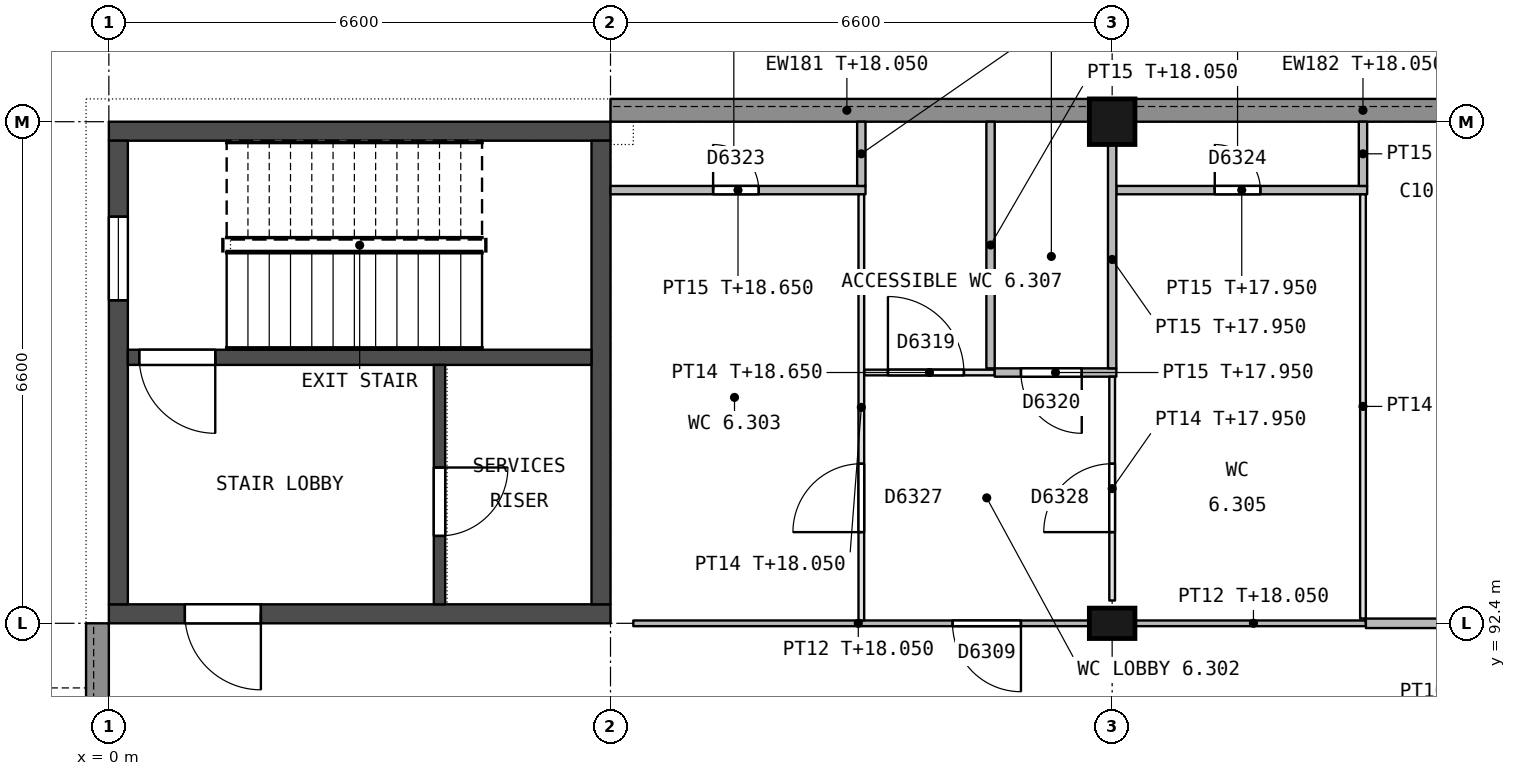
"""IFC4 building model, lengths in metres.
Left out: names, types, materials, properties, quantities, classifications, styles, units other than length and angle.
Written with IfcOpenShell. Run it as: python <this file> out.ifc"""

import sys

from ifc_helpers import new_model, si_unit, direction, frame, frame_2d, origin, origin_2d, place, context, subcontext, project, spatial, rectangle, extrude, element, fill, save


model = new_model("IFC4")
c1 = context("Model", 3, precision=1e-05, world=origin(), true_north=direction((0.0, 1.0)))
c2 = subcontext(c1, "Body", "Model", "MODEL_VIEW")
j1 = project(units=[si_unit("LENGTHUNIT", "METRE"), si_unit("PLANEANGLEUNIT", "RADIAN")], contexts=[c1])
p1 = place(None, origin())
s1 = spatial("IfcSite", under=j1, at=p1, CompositionType="ELEMENT")
p2 = place(p1, origin())
s2 = spatial("IfcBuilding", under=s1, at=p2, CompositionType="ELEMENT")
p3 = place(p2, frame((0.0, 0.0, 14.4)))
s3 = spatial("IfcBuildingStorey", under=s2, at=p3, CompositionType="ELEMENT", Elevation=14.4)
p4 = place(p3, frame((13.2, 92.4, 0.0), z_axis=(0.0, 0.0, 1.0), x_axis=(1.0, 0.0, 0.0)))
e1 = element("IfcColumn", 1, at=p4, inside=s3, PredefinedType="COLUMN", context=c2, shape_type="SweptSolid", body=[
    extrude(rectangle(XDim=0.6, YDim=0.4, at=origin_2d()), origin(), (0.0, 0.0, 1.0), 4.5),
])
p5 = place(p3, frame((13.2, 99.0, 0.0), z_axis=(0.0, 0.0, 1.0), x_axis=(1.0, 0.0, 0.0)))
e2 = element("IfcColumn", 2, at=p5, inside=s3, PredefinedType="COLUMN", context=c2, shape_type="SweptSolid", body=[
    extrude(rectangle(XDim=0.6, YDim=0.6, at=origin_2d()), origin(), (0.0, 0.0, 1.0), 4.5),
])
p6 = place(p3, frame((0.0, 92.525, 0.0), z_axis=(0.0, 0.0, 1.0), x_axis=(1.0, 0.0, 0.0)))
e3 = element("IfcWall", 3, at=p6, inside=s3, PredefinedType="SHEAR", context=c2, shape_type="SweptSolid", body=[
    extrude(rectangle(XDim=6.6, YDim=0.25, at=frame_2d((3.3, 0.0))), origin(), (0.0, 0.0, 1.0), 4.25),
])
p7 = place(p6, frame((1.0, 0.0, 0.0)))
e4 = element("IfcOpeningElement", 4, at=p7, cuts=e3, PredefinedType="OPENING", context=c2, shape_type="SweptSolid", body=[
    extrude(rectangle(XDim=1.0, YDim=2.1, at=frame_2d((0.5, 1.05))), frame((0.0, 0.135, 0.0), z_axis=(0.0, -1.0, 0.0), x_axis=(1.0, 0.0, 0.0)), (0.0, 0.0, 1.0), 0.27),
])
p8 = place(p3, frame((0.0, 98.875, 0.0), z_axis=(0.0, 0.0, 1.0), x_axis=(1.0, 0.0, 0.0)))
e5 = element("IfcWall", 5, at=p8, inside=s3, PredefinedType="SHEAR", context=c2, shape_type="SweptSolid", body=[
    extrude(rectangle(XDim=6.6, YDim=0.25, at=frame_2d((3.3, 0.0))), origin(), (0.0, 0.0, 1.0), 4.25),
])
p9 = place(p3, frame((0.125, 92.65, 0.0), z_axis=(0.0, 0.0, 1.0), x_axis=(0.0, 1.0, 0.0)))
e6 = element("IfcWall", 6, at=p9, inside=s3, PredefinedType="SHEAR", context=c2, shape_type="SweptSolid", body=[
    extrude(rectangle(XDim=6.1, YDim=0.25, at=frame_2d((3.05, 0.0))), origin(), (0.0, 0.0, 1.0), 4.25),
])
p10 = place(p9, frame((4.0, 0.0, 0.7)))
e7 = element("IfcOpeningElement", 7, at=p10, cuts=e6, PredefinedType="OPENING", context=c2, shape_type="SweptSolid", body=[
    extrude(rectangle(XDim=1.1, YDim=1.5, at=frame_2d((0.55, 0.75))), frame((0.0, 0.135, 0.0), z_axis=(0.0, -1.0, 0.0), x_axis=(1.0, 0.0, 0.0)), (0.0, 0.0, 1.0), 0.27),
])
p11 = place(p3, frame((6.475, 92.65, 0.0), z_axis=(0.0, 0.0, 1.0), x_axis=(0.0, 1.0, 0.0)))
e8 = element("IfcWall", 8, at=p11, inside=s3, PredefinedType="SHEAR", context=c2, shape_type="SweptSolid", body=[
    extrude(rectangle(XDim=6.1, YDim=0.25, at=frame_2d((3.05, 0.0))), origin(), (0.0, 0.0, 1.0), 4.25),
])
p12 = place(p3, frame((0.25, 95.9, 0.0), z_axis=(0.0, 0.0, 1.0), x_axis=(1.0, 0.0, 0.0)))
e9 = element("IfcWall", 9, at=p12, inside=s3, PredefinedType="SHEAR", context=c2, shape_type="SweptSolid", body=[
    extrude(rectangle(XDim=6.1, YDim=0.2, at=frame_2d((3.05, 0.0))), origin(), (0.0, 0.0, 1.0), 4.25),
])
p13 = place(p12, frame((0.15, 0.0, 0.0)))
e10 = element("IfcOpeningElement", 10, at=p13, cuts=e9, PredefinedType="OPENING", context=c2, shape_type="SweptSolid", body=[
    extrude(rectangle(XDim=1.0, YDim=2.1, at=frame_2d((0.5, 1.05))), frame((0.0, 0.11, 0.0), z_axis=(0.0, -1.0, 0.0), x_axis=(1.0, 0.0, 0.0)), (0.0, 0.0, 1.0), 0.22),
])
p14 = place(p3, frame((4.35, 92.65, 0.0), z_axis=(0.0, 0.0, 1.0), x_axis=(0.0, 1.0, 0.0)))
e11 = element("IfcWall", 11, at=p14, inside=s3, PredefinedType="SHEAR", context=c2, shape_type="SweptSolid", body=[
    extrude(rectangle(XDim=3.15, YDim=0.15, at=frame_2d((1.575, 0.0))), origin(), (0.0, 0.0, 1.0), 4.25),
])
p15 = place(p14, frame((0.9, 0.0, 0.0)))
e12 = element("IfcOpeningElement", 12, at=p15, cuts=e11, PredefinedType="OPENING", context=c2, shape_type="SweptSolid", body=[
    extrude(rectangle(XDim=0.9, YDim=2.1, at=frame_2d((0.45, 1.05))), frame((0.0, 0.085, 0.0), z_axis=(0.0, -1.0, 0.0), x_axis=(1.0, 0.0, 0.0)), (0.0, 0.0, 1.0), 0.17),
])
p16 = place(p3, frame((6.6, 99.15, 0.0), z_axis=(0.0, 0.0, 1.0), x_axis=(1.0, 0.0, 0.0)))
e13 = element("IfcWall", 13, at=p16, inside=s3, PredefinedType="STANDARD", context=c2, shape_type="SweptSolid", body=[
    extrude(rectangle(XDim=6.3, YDim=0.3, at=frame_2d((3.15, 0.0))), origin(), (0.0, 0.0, 1.0), 3.65),
])
p17 = place(p3, frame((13.5, 99.15, 0.0), z_axis=(0.0, 0.0, 1.0), x_axis=(1.0, 0.0, 0.0)))
e14 = element("IfcWall", 14, at=p17, inside=s3, PredefinedType="STANDARD", context=c2, shape_type="SweptSolid", body=[
    extrude(rectangle(XDim=6.0, YDim=0.3, at=frame_2d((3.0, 0.0))), origin(), (0.0, 0.0, 1.0), 3.65),
])
p18 = place(p3, frame((-0.15, 89.3, 0.0), z_axis=(0.0, 0.0, 1.0), x_axis=(0.0, 1.0, 0.0)))
e15 = element("IfcWall", 15, at=p18, inside=s3, PredefinedType="STANDARD", context=c2, shape_type="SweptSolid", body=[
    extrude(rectangle(XDim=3.1, YDim=0.3, at=frame_2d((1.55, 0.0))), origin(), (0.0, 0.0, 1.0), 3.65),
])
p19 = place(p18, frame((0.85, 0.0, 1.1)))
e16 = element("IfcOpeningElement", 16, at=p19, cuts=e15, PredefinedType="OPENING", context=c2, shape_type="SweptSolid", body=[
    extrude(rectangle(XDim=1.2, YDim=1.2, at=frame_2d((0.6, 0.6))), frame((0.0, 0.16, 0.0), z_axis=(0.0, -1.0, 0.0), x_axis=(1.0, 0.0, 0.0)), (0.0, 0.0, 1.0), 0.32),
])
p20 = place(p3, frame((6.9, 92.4, 0.0), z_axis=(0.0, 0.0, 1.0), x_axis=(1.0, 0.0, 0.0)))
e17 = element("IfcWall", 17, at=p20, inside=s3, PredefinedType="PARTITIONING", context=c2, shape_type="SweptSolid", body=[
    extrude(rectangle(XDim=6.0, YDim=0.075, at=frame_2d((3.0, 0.0))), origin(), (0.0, 0.0, 1.0), 3.65),
])
p21 = place(p20, frame((4.2, 0.0, 0.0)))
e18 = element("IfcOpeningElement", 18, at=p21, cuts=e17, PredefinedType="OPENING", context=c2, shape_type="SweptSolid", body=[
    extrude(rectangle(XDim=0.9, YDim=2.1, at=frame_2d((0.45, 1.05))), frame((0.0, 0.047, 0.0), z_axis=(0.0, -1.0, 0.0), x_axis=(1.0, 0.0, 0.0)), (0.0, 0.0, 1.0), 0.095),
])
p22 = place(p3, frame((13.5, 92.4, 0.0), z_axis=(0.0, 0.0, 1.0), x_axis=(1.0, 0.0, 0.0)))
e19 = element("IfcWall", 19, at=p22, inside=s3, PredefinedType="PARTITIONING", context=c2, shape_type="SweptSolid", body=[
    extrude(rectangle(XDim=3.038, YDim=0.075, at=frame_2d((1.519, 0.0))), origin(), (0.0, 0.0, 1.0), 3.65),
])
p23 = place(p3, frame((16.538, 92.4, 0.0), z_axis=(0.0, 0.0, 1.0), x_axis=(1.0, 0.0, 0.0)))
e20 = element("IfcWall", 20, at=p23, inside=s3, PredefinedType="PARTITIONING", context=c2, shape_type="SweptSolid", body=[
    extrude(rectangle(XDim=2.962, YDim=0.125, at=frame_2d((1.481, 0.0))), origin(), (0.0, 0.0, 1.0), 3.65),
])
p24 = place(p23, frame((1.862, 0.0, 0.0)))
e21 = element("IfcOpeningElement", 21, at=p24, cuts=e20, PredefinedType="OPENING", context=c2, shape_type="SweptSolid", body=[
    extrude(rectangle(XDim=1.0, YDim=2.1, at=frame_2d((0.5, 1.05))), frame((0.0, 0.073, 0.0), z_axis=(0.0, -1.0, 0.0), x_axis=(1.0, 0.0, 0.0)), (0.0, 0.0, 1.0), 0.145),
])
p25 = place(p3, frame((11.655, 95.7, 0.0), z_axis=(0.0, 0.0, 1.0), x_axis=(-1.0, 0.0, 0.0)))
e22 = element("IfcWall", 22, at=p25, inside=s3, PredefinedType="PARTITIONING", context=c2, shape_type="SweptSolid", body=[
    extrude(rectangle(XDim=1.717, YDim=0.075, at=frame_2d((0.858, 0.0))), origin(), (0.0, 0.0, 1.0), 4.25),
])
p26 = place(p25, frame((0.405, 0.0, 0.0)))
e23 = element("IfcOpeningElement", 23, at=p26, cuts=e22, PredefinedType="OPENING", context=c2, shape_type="SweptSolid", body=[
    extrude(rectangle(XDim=1.0, YDim=2.1, at=frame_2d((0.5, 1.05))), frame((0.0, 0.047, 0.0), z_axis=(0.0, -1.0, 0.0), x_axis=(1.0, 0.0, 0.0)), (0.0, 0.0, 1.0), 0.095),
])
p27 = place(p3, frame((11.655, 95.7, 0.0), z_axis=(0.0, 0.0, 1.0), x_axis=(1.0, 0.0, 0.0)))
e24 = element("IfcWall", 24, at=p27, inside=s3, PredefinedType="PARTITIONING", context=c2, shape_type="SweptSolid", body=[
    extrude(rectangle(XDim=1.6, YDim=0.11, at=frame_2d((0.8, 0.0))), origin(), (0.0, 0.0, 1.0), 3.55),
])
p28 = place(p27, frame((0.345, 0.0, 0.0)))
e25 = element("IfcOpeningElement", 25, at=p28, cuts=e24, PredefinedType="OPENING", context=c2, shape_type="SweptSolid", body=[
    extrude(rectangle(XDim=0.8, YDim=2.1, at=frame_2d((0.4, 1.05))), frame((0.0, 0.065, 0.0), z_axis=(0.0, -1.0, 0.0), x_axis=(1.0, 0.0, 0.0)), (0.0, 0.0, 1.0), 0.13),
])
p29 = place(p3, frame((9.955, 98.1, 0.0), z_axis=(0.0, 0.0, 1.0), x_axis=(-1.0, 0.0, 0.0)))
e26 = element("IfcWall", 26, at=p29, inside=s3, PredefinedType="PARTITIONING", context=c2, shape_type="SweptSolid", body=[
    extrude(rectangle(XDim=3.355, YDim=0.11, at=frame_2d((1.677, 0.0))), origin(), (0.0, 0.0, 1.0), 4.25),
])
p30 = place(p29, frame((1.405, 0.0, 0.0)))
e27 = element("IfcOpeningElement", 27, at=p30, cuts=e26, PredefinedType="OPENING", context=c2, shape_type="SweptSolid", body=[
    extrude(rectangle(XDim=0.6, YDim=2.1, at=frame_2d((0.3, 1.05))), frame((0.0, 0.065, 0.0), z_axis=(0.0, -1.0, 0.0), x_axis=(1.0, 0.0, 0.0)), (0.0, 0.0, 1.0), 0.13),
])
p31 = place(p3, frame((16.555, 98.1, 0.0), z_axis=(0.0, 0.0, 1.0), x_axis=(-1.0, 0.0, 0.0)))
e28 = element("IfcWall", 28, at=p31, inside=s3, PredefinedType="PARTITIONING", context=c2, shape_type="SweptSolid", body=[
    extrude(rectangle(XDim=3.3, YDim=0.11, at=frame_2d((1.65, 0.0))), origin(), (0.0, 0.0, 1.0), 3.55),
])
p32 = place(p31, frame((1.405, 0.0, 0.0)))
e29 = element("IfcOpeningElement", 29, at=p32, cuts=e28, PredefinedType="OPENING", context=c2, shape_type="SweptSolid", body=[
    extrude(rectangle(XDim=0.6, YDim=2.1, at=frame_2d((0.3, 1.05))), frame((0.0, 0.065, 0.0), z_axis=(0.0, -1.0, 0.0), x_axis=(1.0, 0.0, 0.0)), (0.0, 0.0, 1.0), 0.13),
])
p33 = place(p3, frame((9.9, 92.438, 0.0), z_axis=(0.0, 0.0, 1.0), x_axis=(0.0, 1.0, 0.0)))
e30 = element("IfcWall", 30, at=p33, inside=s3, PredefinedType="PARTITIONING", context=c2, shape_type="SweptSolid", body=[
    extrude(rectangle(XDim=5.607, YDim=0.075, at=frame_2d((2.803, 0.0))), origin(), (0.0, 0.0, 1.0), 3.65),
])
p34 = place(p33, frame((1.162, 0.0, 0.0)))
e31 = element("IfcOpeningElement", 31, at=p34, cuts=e30, PredefinedType="OPENING", context=c2, shape_type="SweptSolid", body=[
    extrude(rectangle(XDim=0.9, YDim=2.1, at=frame_2d((0.45, 1.05))), frame((0.0, 0.047, 0.0), z_axis=(0.0, -1.0, 0.0), x_axis=(1.0, 0.0, 0.0)), (0.0, 0.0, 1.0), 0.095),
])
p35 = place(p3, frame((9.9, 98.155, 0.0), z_axis=(0.0, 0.0, 1.0), x_axis=(0.0, 1.0, 0.0)))
e32 = element("IfcWall", 32, at=p35, inside=s3, PredefinedType="PARTITIONING", context=c2, shape_type="SweptSolid", body=[
    extrude(rectangle(XDim=0.845, YDim=0.11, at=frame_2d((0.422, 0.0))), origin(), (0.0, 0.0, 1.0), 3.65),
])
p36 = place(p3, frame((11.6, 95.755, 0.0), z_axis=(0.0, 0.0, 1.0), x_axis=(0.0, 1.0, 0.0)))
e33 = element("IfcWall", 33, at=p36, inside=s3, PredefinedType="PARTITIONING", context=c2, shape_type="SweptSolid", body=[
    extrude(rectangle(XDim=3.245, YDim=0.11, at=frame_2d((1.623, 0.0))), origin(), (0.0, 0.0, 1.0), 3.65),
])
p37 = place(p3, frame((13.2, 95.645, 0.0), z_axis=(0.0, 0.0, 1.0), x_axis=(0.0, -1.0, 0.0)))
e34 = element("IfcWall", 34, at=p37, inside=s3, PredefinedType="PARTITIONING", context=c2, shape_type="SweptSolid", body=[
    extrude(rectangle(XDim=2.945, YDim=0.075, at=frame_2d((1.473, 0.0))), origin(), (0.0, 0.0, 1.0), 3.55),
])
p38 = place(p37, frame((1.145, 0.0, 0.0)))
e35 = element("IfcOpeningElement", 35, at=p38, cuts=e34, PredefinedType="OPENING", context=c2, shape_type="SweptSolid", body=[
    extrude(rectangle(XDim=0.9, YDim=2.1, at=frame_2d((0.45, 1.05))), frame((0.0, 0.047, 0.0), z_axis=(0.0, -1.0, 0.0), x_axis=(1.0, 0.0, 0.0)), (0.0, 0.0, 1.0), 0.095),
])
p39 = place(p3, frame((13.2, 95.755, 0.0), z_axis=(0.0, 0.0, 1.0), x_axis=(0.0, 1.0, 0.0)))
e36 = element("IfcWall", 36, at=p39, inside=s3, PredefinedType="PARTITIONING", context=c2, shape_type="SweptSolid", body=[
    extrude(rectangle(XDim=2.945, YDim=0.11, at=frame_2d((1.473, 0.0))), origin(), (0.0, 0.0, 1.0), 3.55),
])
p40 = place(p3, frame((16.5, 92.463, 0.0), z_axis=(0.0, 0.0, 1.0), x_axis=(0.0, 1.0, 0.0)))
e37 = element("IfcWall", 37, at=p40, inside=s3, PredefinedType="PARTITIONING", context=c2, shape_type="SweptSolid", body=[
    extrude(rectangle(XDim=5.582, YDim=0.075, at=frame_2d((2.791, 0.0))), origin(), (0.0, 0.0, 1.0), 3.65),
])
p41 = place(p3, frame((16.5, 98.155, 0.0), z_axis=(0.0, 0.0, 1.0), x_axis=(0.0, 1.0, 0.0)))
e38 = element("IfcWall", 38, at=p41, inside=s3, PredefinedType="PARTITIONING", context=c2, shape_type="SweptSolid", body=[
    extrude(rectangle(XDim=0.845, YDim=0.11, at=frame_2d((0.422, 0.0))), origin(), (0.0, 0.0, 1.0), 3.65),
])
p42 = place(p15, origin())
e39 = element("IfcDoor", 39, at=p42, inside=s3, OperationType="SINGLE_SWING_RIGHT", PredefinedType="DOOR", context=c2, shape_type="SweptSolid", body=[
    extrude(rectangle(XDim=0.9, YDim=2.1, at=frame_2d((0.45, 1.05))), frame((0.0, 0.025, 0.0), z_axis=(0.0, -1.0, 0.0), x_axis=(1.0, 0.0, 0.0)), (0.0, 0.0, 1.0), 0.05),
])
fill(e12, e39)
p43 = place(p7, origin())
e40 = element("IfcDoor", 40, at=p43, inside=s3, OperationType="SINGLE_SWING_RIGHT", PredefinedType="DOOR", context=c2, shape_type="SweptSolid", body=[
    extrude(rectangle(XDim=1.0, YDim=2.1, at=frame_2d((0.5, 1.05))), frame((0.0, 0.025, 0.0), z_axis=(0.0, -1.0, 0.0), x_axis=(1.0, 0.0, 0.0)), (0.0, 0.0, 1.0), 0.05),
])
fill(e4, e40)
p44 = place(p13, origin())
e41 = element("IfcDoor", 41, at=p44, inside=s3, OperationType="SINGLE_SWING_RIGHT", PredefinedType="DOOR", context=c2, shape_type="SweptSolid", body=[
    extrude(rectangle(XDim=1.0, YDim=2.1, at=frame_2d((0.5, 1.05))), frame((0.0, 0.025, 0.0), z_axis=(0.0, -1.0, 0.0), x_axis=(1.0, 0.0, 0.0)), (0.0, 0.0, 1.0), 0.05),
])
fill(e10, e41)
p45 = place(p10, origin())
e42 = element("IfcWindow", 42, at=p45, inside=s3, PartitioningType="SINGLE_PANEL", PredefinedType="WINDOW", context=c2, shape_type="SweptSolid", body=[
    extrude(rectangle(XDim=1.1, YDim=1.5, at=frame_2d((0.55, 0.75))), frame((0.0, 0.03, 0.0), z_axis=(0.0, -1.0, 0.0), x_axis=(1.0, 0.0, 0.0)), (0.0, 0.0, 1.0), 0.06),
])
fill(e7, e42)
p46 = place(p21, origin())
e43 = element("IfcDoor", 43, at=p46, inside=s3, OperationType="SINGLE_SWING_RIGHT", PredefinedType="DOOR", context=c2, shape_type="SweptSolid", body=[
    extrude(rectangle(XDim=0.9, YDim=2.1, at=frame_2d((0.45, 1.05))), frame((0.0, 0.025, 0.0), z_axis=(0.0, -1.0, 0.0), x_axis=(1.0, 0.0, 0.0)), (0.0, 0.0, 1.0), 0.05),
])
fill(e18, e43)
p47 = place(p26, origin())
e44 = element("IfcDoor", 44, at=p47, inside=s3, OperationType="SINGLE_SWING_RIGHT", PredefinedType="DOOR", context=c2, shape_type="SweptSolid", body=[
    extrude(rectangle(XDim=1.0, YDim=2.1, at=frame_2d((0.5, 1.05))), frame((0.0, 0.025, 0.0), z_axis=(0.0, -1.0, 0.0), x_axis=(1.0, 0.0, 0.0)), (0.0, 0.0, 1.0), 0.05),
])
fill(e23, e44)
p48 = place(p28, origin())
e45 = element("IfcDoor", 45, at=p48, inside=s3, OperationType="SINGLE_SWING_RIGHT", PredefinedType="DOOR", context=c2, shape_type="SweptSolid", body=[
    extrude(rectangle(XDim=0.8, YDim=2.1, at=frame_2d((0.4, 1.05))), frame((0.0, 0.025, 0.0), z_axis=(0.0, -1.0, 0.0), x_axis=(1.0, 0.0, 0.0)), (0.0, 0.0, 1.0), 0.05),
])
fill(e25, e45)
p49 = place(p30, origin())
e46 = element("IfcDoor", 46, at=p49, inside=s3, OperationType="SINGLE_SWING_RIGHT", PredefinedType="DOOR", context=c2, shape_type="SweptSolid", body=[
    extrude(rectangle(XDim=0.6, YDim=2.1, at=frame_2d((0.3, 1.05))), frame((0.0, 0.025, 0.0), z_axis=(0.0, -1.0, 0.0), x_axis=(1.0, 0.0, 0.0)), (0.0, 0.0, 1.0), 0.05),
])
fill(e27, e46)
p50 = place(p32, origin())
e47 = element("IfcDoor", 47, at=p50, inside=s3, OperationType="SINGLE_SWING_RIGHT", PredefinedType="DOOR", context=c2, shape_type="SweptSolid", body=[
    extrude(rectangle(XDim=0.6, YDim=2.1, at=frame_2d((0.3, 1.05))), frame((0.0, 0.025, 0.0), z_axis=(0.0, -1.0, 0.0), x_axis=(1.0, 0.0, 0.0)), (0.0, 0.0, 1.0), 0.05),
])
fill(e29, e47)
p51 = place(p34, origin())
e48 = element("IfcDoor", 48, at=p51, inside=s3, OperationType="SINGLE_SWING_LEFT", PredefinedType="DOOR", context=c2, shape_type="SweptSolid", body=[
    extrude(rectangle(XDim=0.9, YDim=2.1, at=frame_2d((0.45, 1.05))), frame((0.0, 0.025, 0.0), z_axis=(0.0, -1.0, 0.0), x_axis=(1.0, 0.0, 0.0)), (0.0, 0.0, 1.0), 0.05),
])
fill(e31, e48)
p52 = place(p38, origin())
e49 = element("IfcDoor", 49, at=p52, inside=s3, OperationType="SINGLE_SWING_RIGHT", PredefinedType="DOOR", context=c2, shape_type="SweptSolid", body=[
    extrude(rectangle(XDim=0.9, YDim=2.1, at=frame_2d((0.45, 1.05))), frame((0.0, 0.025, 0.0), z_axis=(0.0, -1.0, 0.0), x_axis=(1.0, 0.0, 0.0)), (0.0, 0.0, 1.0), 0.05),
])
fill(e35, e49)
save(model, sys.argv[1])
